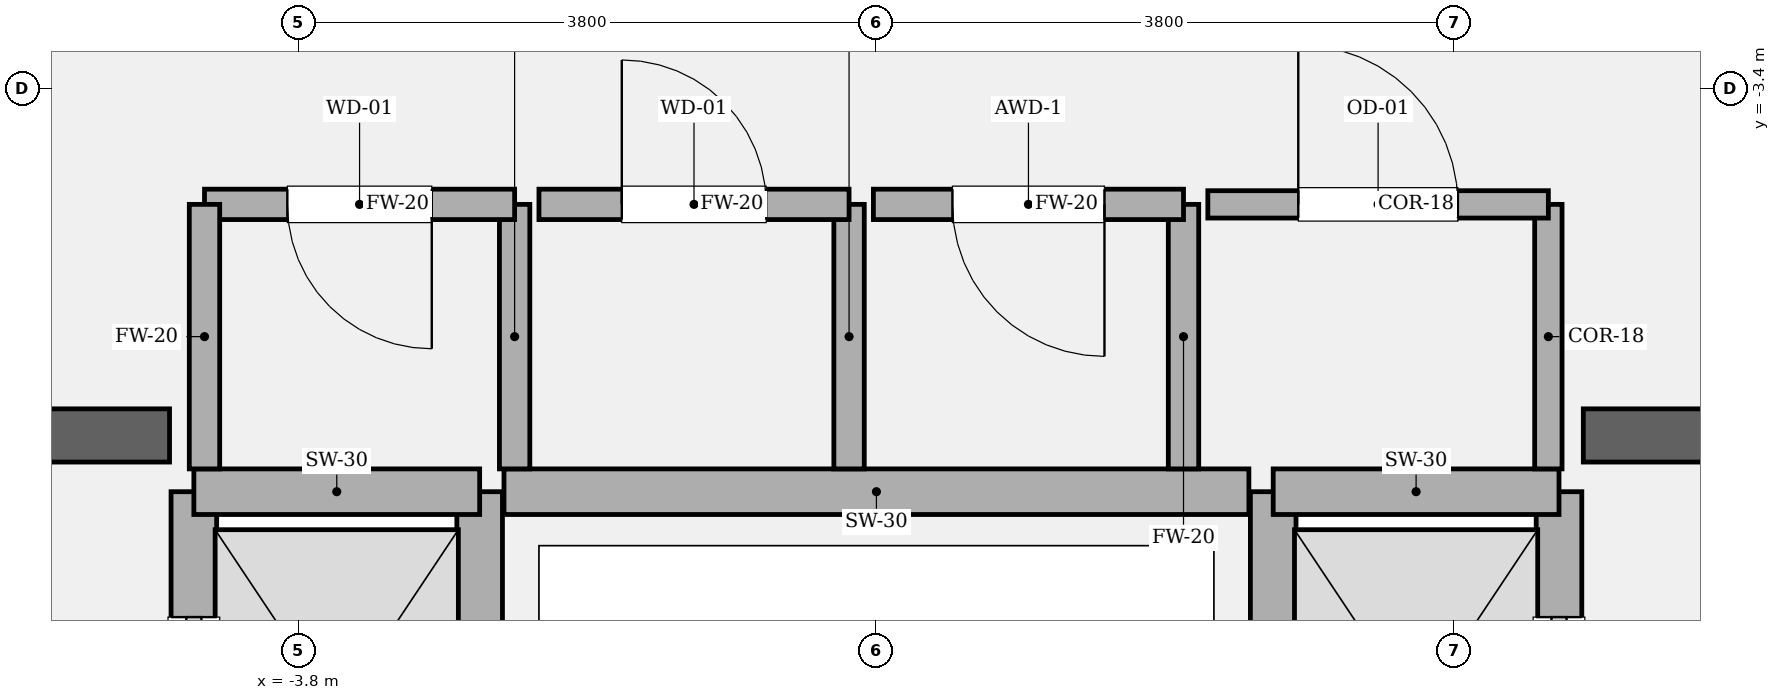
"""IFC4 building model, lengths in metres.
Left out: names, types, materials, properties, quantities, classifications, styles, units other than length and angle.
Written with IfcOpenShell. Run it as: python <this file> out.ifc"""

import sys

from ifc_helpers import new_model, si_unit, direction, frame, frame_2d, origin, place, context, subcontext, project, spatial, rectangle, extrude, element, fill, save


model = new_model("IFC4")
c1 = context("Model", 3, precision=1e-05, world=origin(), true_north=direction((0.0, 1.0)))
c2 = subcontext(c1, "Body", "Model", "MODEL_VIEW")
j1 = project(units=[si_unit("LENGTHUNIT", "METRE"), si_unit("PLANEANGLEUNIT", "RADIAN")], contexts=[c1])
p1 = place(None, origin())
s1 = spatial("IfcSite", under=j1, at=p1, CompositionType="ELEMENT")
p2 = place(p1, origin())
s2 = spatial("IfcBuilding", under=s1, at=p2, CompositionType="ELEMENT")
p3 = place(p2, frame((0.0, 0.0, 64.65)))
s3 = spatial("IfcBuildingStorey", under=s2, at=p3, CompositionType="ELEMENT", Elevation=64.65)
p4 = place(p3, frame((-9.825, -5.68, 0.0), z_axis=(0.0, 0.0, 1.0), x_axis=(1.0, 0.0, 0.0)))
e1 = element("IfcWall", 1, at=p4, inside=s3, PredefinedType="SOLIDWALL", context=c2, shape_type="SweptSolid", body=[
    extrude(rectangle(XDim=5.175, YDim=0.35, at=frame_2d((2.587, 0.0))), origin(), (0.0, 0.0, 1.0), 4.05),
])
p5 = place(p4, frame((1.285, 0.0, 0.0)))
e2 = element("IfcOpeningElement", 2, at=p5, cuts=e1, PredefinedType="OPENING", context=c2, shape_type="SweptSolid", body=[
    extrude(rectangle(XDim=1.18, YDim=2.2, at=frame_2d((0.59, 1.1))), frame((0.0, 0.185, 0.0), z_axis=(0.0, -1.0, 0.0), x_axis=(1.0, 0.0, 0.0)), (0.0, 0.0, 1.0), 0.37),
])
p6 = place(p3, frame((4.65, -5.68, 0.0), z_axis=(0.0, 0.0, 1.0), x_axis=(1.0, 0.0, 0.0)))
e3 = element("IfcWall", 3, at=p6, inside=s3, PredefinedType="SOLIDWALL", context=c2, shape_type="SweptSolid", body=[
    extrude(rectangle(XDim=5.175, YDim=0.35, at=frame_2d((2.587, 0.0))), origin(), (0.0, 0.0, 1.0), 4.05),
])
p7 = place(p6, frame((2.71, 0.0, 0.0)))
e4 = element("IfcOpeningElement", 4, at=p7, cuts=e3, PredefinedType="OPENING", context=c2, shape_type="SweptSolid", body=[
    extrude(rectangle(XDim=1.18, YDim=2.2, at=frame_2d((0.59, 1.1))), frame((0.0, 0.185, 0.0), z_axis=(0.0, -1.0, 0.0), x_axis=(1.0, 0.0, 0.0)), (0.0, 0.0, 1.0), 0.37),
])
p8 = place(p3, frame((-4.49, -8.82, 0.0), z_axis=(0.0, 0.0, 1.0), x_axis=(0.0, 1.0, 0.0)))
e5 = element("IfcWall", 5, at=p8, inside=s3, PredefinedType="SOLIDWALL", context=c2, shape_type="SweptSolid", body=[
    extrude(rectangle(XDim=2.77, YDim=0.3, at=frame_2d((1.385, 0.0))), origin(), (0.0, 0.0, 1.0), 3.81),
])
p9 = place(p8, frame((0.825, 0.0, 0.0)))
e6 = element("IfcOpeningElement", 6, at=p9, cuts=e5, PredefinedType="OPENING", context=c2, shape_type="SweptSolid", body=[
    extrude(rectangle(XDim=1.12, YDim=2.25, at=frame_2d((0.56, 1.125))), frame((0.0, 0.16, 0.0), z_axis=(0.0, -1.0, 0.0), x_axis=(1.0, 0.0, 0.0)), (0.0, 0.0, 1.0), 0.32),
])
p10 = place(p3, frame((-2.61, -8.82, 0.0), z_axis=(0.0, 0.0, 1.0), x_axis=(0.0, 1.0, 0.0)))
e7 = element("IfcWall", 7, at=p10, inside=s3, PredefinedType="SOLIDWALL", context=c2, shape_type="SweptSolid", body=[
    extrude(rectangle(XDim=2.77, YDim=0.3, at=frame_2d((1.385, 0.0))), origin(), (0.0, 0.0, 1.0), 3.81),
])
p11 = place(p3, frame((-4.49, -6.05, 0.0), z_axis=(0.0, 0.0, 1.0), x_axis=(1.0, 0.0, 0.0)))
e8 = element("IfcWall", 8, at=p11, inside=s3, PredefinedType="SOLIDWALL", context=c2, shape_type="SweptSolid", body=[
    extrude(rectangle(XDim=1.88, YDim=0.3, at=frame_2d((0.94, 0.0))), origin(), (0.0, 0.0, 1.0), 3.81),
])
p12 = place(p3, frame((4.49, -8.82, 0.0), z_axis=(0.0, 0.0, 1.0), x_axis=(0.0, 1.0, 0.0)))
e9 = element("IfcWall", 9, at=p12, inside=s3, PredefinedType="SOLIDWALL", context=c2, shape_type="SweptSolid", body=[
    extrude(rectangle(XDim=2.77, YDim=0.3, at=frame_2d((1.385, 0.0))), origin(), (0.0, 0.0, 1.0), 3.81),
])
p13 = place(p12, frame((0.825, 0.0, 0.0)))
e10 = element("IfcOpeningElement", 10, at=p13, cuts=e9, PredefinedType="OPENING", context=c2, shape_type="SweptSolid", body=[
    extrude(rectangle(XDim=1.12, YDim=2.25, at=frame_2d((0.56, 1.125))), frame((0.0, 0.16, 0.0), z_axis=(0.0, -1.0, 0.0), x_axis=(1.0, 0.0, 0.0)), (0.0, 0.0, 1.0), 0.32),
])
p14 = place(p3, frame((2.61, -8.82, 0.0), z_axis=(0.0, 0.0, 1.0), x_axis=(0.0, 1.0, 0.0)))
e11 = element("IfcWall", 11, at=p14, inside=s3, PredefinedType="SOLIDWALL", context=c2, shape_type="SweptSolid", body=[
    extrude(rectangle(XDim=2.77, YDim=0.3, at=frame_2d((1.385, 0.0))), origin(), (0.0, 0.0, 1.0), 3.81),
])
p15 = place(p3, frame((2.61, -6.05, 0.0), z_axis=(0.0, 0.0, 1.0), x_axis=(1.0, 0.0, 0.0)))
e12 = element("IfcWall", 12, at=p15, inside=s3, PredefinedType="SOLIDWALL", context=c2, shape_type="SweptSolid", body=[
    extrude(rectangle(XDim=1.88, YDim=0.3, at=frame_2d((0.94, 0.0))), origin(), (0.0, 0.0, 1.0), 3.81),
])
p16 = place(p3, frame((-2.45, -6.05, 0.0), z_axis=(0.0, 0.0, 1.0), x_axis=(1.0, 0.0, 0.0)))
e13 = element("IfcWall", 13, at=p16, inside=s3, PredefinedType="SOLIDWALL", context=c2, shape_type="SweptSolid", body=[
    extrude(rectangle(XDim=4.9, YDim=0.3, at=frame_2d((2.45, 0.0))), origin(), (0.0, 0.0, 1.0), 3.81),
])
p17 = place(p3, frame((-2.38, -5.9, 0.0), z_axis=(0.0, 0.0, 1.0), x_axis=(0.0, 1.0, 0.0)))
e14 = element("IfcWall", 14, at=p17, inside=s3, PredefinedType="SOLIDWALL", context=c2, shape_type="SweptSolid", body=[
    extrude(rectangle(XDim=1.74, YDim=0.2, at=frame_2d((0.87, 0.0))), origin(), (0.0, 0.0, 1.0), 3.81),
])
p18 = place(p3, frame((-2.38, -4.16, 0.0), z_axis=(0.0, 0.0, 1.0), x_axis=(-1.0, 0.0, 0.0)))
e15 = element("IfcWall", 15, at=p18, inside=s3, PredefinedType="SOLIDWALL", context=c2, shape_type="SweptSolid", body=[
    extrude(rectangle(XDim=2.04, YDim=0.2, at=frame_2d((1.02, 0.0))), origin(), (0.0, 0.0, 1.0), 3.81),
])
p19 = place(p18, frame((0.545, 0.0, 0.0)))
e16 = element("IfcOpeningElement", 16, at=p19, cuts=e15, PredefinedType="OPENING", context=c2, shape_type="SweptSolid", body=[
    extrude(rectangle(XDim=0.95, YDim=2.15, at=frame_2d((0.475, 1.075))), frame((0.0, 0.11, 0.0), z_axis=(0.0, -1.0, 0.0), x_axis=(1.0, 0.0, 0.0)), (0.0, 0.0, 1.0), 0.22),
])
for number, where, z_axis, x_axis in (
    (17, (-4.42, -4.16, 0.0), (0.0, 0.0, 1.0), (0.0, -1.0, 0.0)),
    (18, (-0.18, -5.9, 0.0), (0.0, 0.0, 1.0), (0.0, 1.0, 0.0)),
):
    element("IfcWall", number, at=place(p3, frame(where, z_axis=z_axis, x_axis=x_axis)), inside=s3, PredefinedType="SOLIDWALL", context=c2, shape_type="SweptSolid", body=[
        extrude(rectangle(XDim=1.74, YDim=0.2, at=frame_2d((0.87, 0.0))), origin(), (0.0, 0.0, 1.0), 3.81),
    ])
p20 = place(p3, frame((-0.18, -4.16, 0.0), z_axis=(0.0, 0.0, 1.0), x_axis=(-1.0, 0.0, 0.0)))
e19 = element("IfcWall", 19, at=p20, inside=s3, PredefinedType="SOLIDWALL", context=c2, shape_type="SweptSolid", body=[
    extrude(rectangle(XDim=2.04, YDim=0.2, at=frame_2d((1.02, 0.0))), origin(), (0.0, 0.0, 1.0), 3.81),
])
p21 = place(p20, frame((0.545, 0.0, 0.0)))
e20 = element("IfcOpeningElement", 20, at=p21, cuts=e19, PredefinedType="OPENING", context=c2, shape_type="SweptSolid", body=[
    extrude(rectangle(XDim=0.95, YDim=2.15, at=frame_2d((0.475, 1.075))), frame((0.0, 0.11, 0.0), z_axis=(0.0, -1.0, 0.0), x_axis=(1.0, 0.0, 0.0)), (0.0, 0.0, 1.0), 0.22),
])
p22 = place(p3, frame((2.02, -5.9, 0.0), z_axis=(0.0, 0.0, 1.0), x_axis=(0.0, 1.0, 0.0)))
e21 = element("IfcWall", 21, at=p22, inside=s3, PredefinedType="SOLIDWALL", context=c2, shape_type="SweptSolid", body=[
    extrude(rectangle(XDim=1.74, YDim=0.2, at=frame_2d((0.87, 0.0))), origin(), (0.0, 0.0, 1.0), 3.81),
])
p23 = place(p3, frame((2.02, -4.16, 0.0), z_axis=(0.0, 0.0, 1.0), x_axis=(-1.0, 0.0, 0.0)))
e22 = element("IfcWall", 22, at=p23, inside=s3, PredefinedType="SOLIDWALL", context=c2, shape_type="SweptSolid", body=[
    extrude(rectangle(XDim=2.04, YDim=0.2, at=frame_2d((1.02, 0.0))), origin(), (0.0, 0.0, 1.0), 3.81),
])
p24 = place(p23, frame((0.52, 0.0, 0.0)))
e23 = element("IfcOpeningElement", 23, at=p24, cuts=e22, PredefinedType="OPENING", context=c2, shape_type="SweptSolid", body=[
    extrude(rectangle(XDim=1.0, YDim=2.15, at=frame_2d((0.5, 1.075))), frame((0.0, 0.11, 0.0), z_axis=(0.0, -1.0, 0.0), x_axis=(1.0, 0.0, 0.0)), (0.0, 0.0, 1.0), 0.22),
])
p25 = place(p3, frame((4.42, -5.9, 0.0), z_axis=(0.0, 0.0, 1.0), x_axis=(0.0, 1.0, 0.0)))
e24 = element("IfcWall", 24, at=p25, inside=s3, PredefinedType="PARTITIONING", context=c2, shape_type="SweptSolid", body=[
    extrude(rectangle(XDim=1.74, YDim=0.18, at=frame_2d((0.87, 0.0))), origin(), (0.0, 0.0, 1.0), 3.81),
])
p26 = place(p3, frame((4.42, -4.16, 0.0), z_axis=(0.0, 0.0, 1.0), x_axis=(-1.0, 0.0, 0.0)))
e25 = element("IfcWall", 25, at=p26, inside=s3, PredefinedType="PARTITIONING", context=c2, shape_type="SweptSolid", body=[
    extrude(rectangle(XDim=2.24, YDim=0.18, at=frame_2d((1.12, 0.0))), origin(), (0.0, 0.0, 1.0), 3.81),
])
p27 = place(p26, frame((0.595, 0.0, 0.0)))
e26 = element("IfcOpeningElement", 26, at=p27, cuts=e25, PredefinedType="OPENING", context=c2, shape_type="SweptSolid", body=[
    extrude(rectangle(XDim=1.05, YDim=2.2, at=frame_2d((0.525, 1.1))), frame((0.0, 0.1, 0.0), z_axis=(0.0, -1.0, 0.0), x_axis=(1.0, 0.0, 0.0)), (0.0, 0.0, 1.0), 0.2),
])
p28 = place(p9, origin())
e27 = element("IfcDoor", 27, at=p28, inside=s3, OperationType="SLIDING_TO_LEFT", PredefinedType="DOOR", context=c2, shape_type="SweptSolid", body=[
    extrude(rectangle(XDim=1.12, YDim=2.25, at=frame_2d((0.56, 1.125))), frame((0.0, 0.025, 0.0), z_axis=(0.0, -1.0, 0.0), x_axis=(1.0, 0.0, 0.0)), (0.0, 0.0, 1.0), 0.05),
])
fill(e6, e27)
p29 = place(p13, origin())
e28 = element("IfcDoor", 28, at=p29, inside=s3, OperationType="SLIDING_TO_RIGHT", PredefinedType="DOOR", context=c2, shape_type="SweptSolid", body=[
    extrude(rectangle(XDim=1.12, YDim=2.25, at=frame_2d((0.56, 1.125))), frame((0.0, 0.025, 0.0), z_axis=(0.0, -1.0, 0.0), x_axis=(1.0, 0.0, 0.0)), (0.0, 0.0, 1.0), 0.05),
])
fill(e10, e28)
p30 = place(p19, origin())
e29 = element("IfcDoor", 29, at=p30, inside=s3, OperationType="SINGLE_SWING_LEFT", PredefinedType="DOOR", context=c2, shape_type="SweptSolid", body=[
    extrude(rectangle(XDim=0.95, YDim=2.15, at=frame_2d((0.475, 1.075))), frame((0.0, 0.025, 0.0), z_axis=(0.0, -1.0, 0.0), x_axis=(1.0, 0.0, 0.0)), (0.0, 0.0, 1.0), 0.05),
])
fill(e16, e29)
p31 = place(p21, origin())
e30 = element("IfcDoor", 30, at=p31, inside=s3, OperationType="SINGLE_SWING_RIGHT", PredefinedType="DOOR", context=c2, shape_type="SweptSolid", body=[
    extrude(rectangle(XDim=0.95, YDim=2.15, at=frame_2d((0.475, 1.075))), frame((0.0, 0.025, 0.0), z_axis=(0.0, -1.0, 0.0), x_axis=(1.0, 0.0, 0.0)), (0.0, 0.0, 1.0), 0.05),
])
fill(e20, e30)
p32 = place(p24, origin())
e31 = element("IfcDoor", 31, at=p32, inside=s3, OperationType="SINGLE_SWING_LEFT", PredefinedType="DOOR", context=c2, shape_type="SweptSolid", body=[
    extrude(rectangle(XDim=1.0, YDim=2.15, at=frame_2d((0.5, 1.075))), frame((0.0, 0.025, 0.0), z_axis=(0.0, -1.0, 0.0), x_axis=(1.0, 0.0, 0.0)), (0.0, 0.0, 1.0), 0.05),
])
fill(e23, e31)
p33 = place(p27, origin())
e32 = element("IfcDoor", 32, at=p33, inside=s3, OperationType="SINGLE_SWING_RIGHT", PredefinedType="DOOR", context=c2, shape_type="SweptSolid", body=[
    extrude(rectangle(XDim=1.05, YDim=2.2, at=frame_2d((0.525, 1.1))), frame((0.0, 0.025, 0.0), z_axis=(0.0, -1.0, 0.0), x_axis=(1.0, 0.0, 0.0)), (0.0, 0.0, 1.0), 0.05),
])
fill(e26, e32)
save(model, sys.argv[1])
